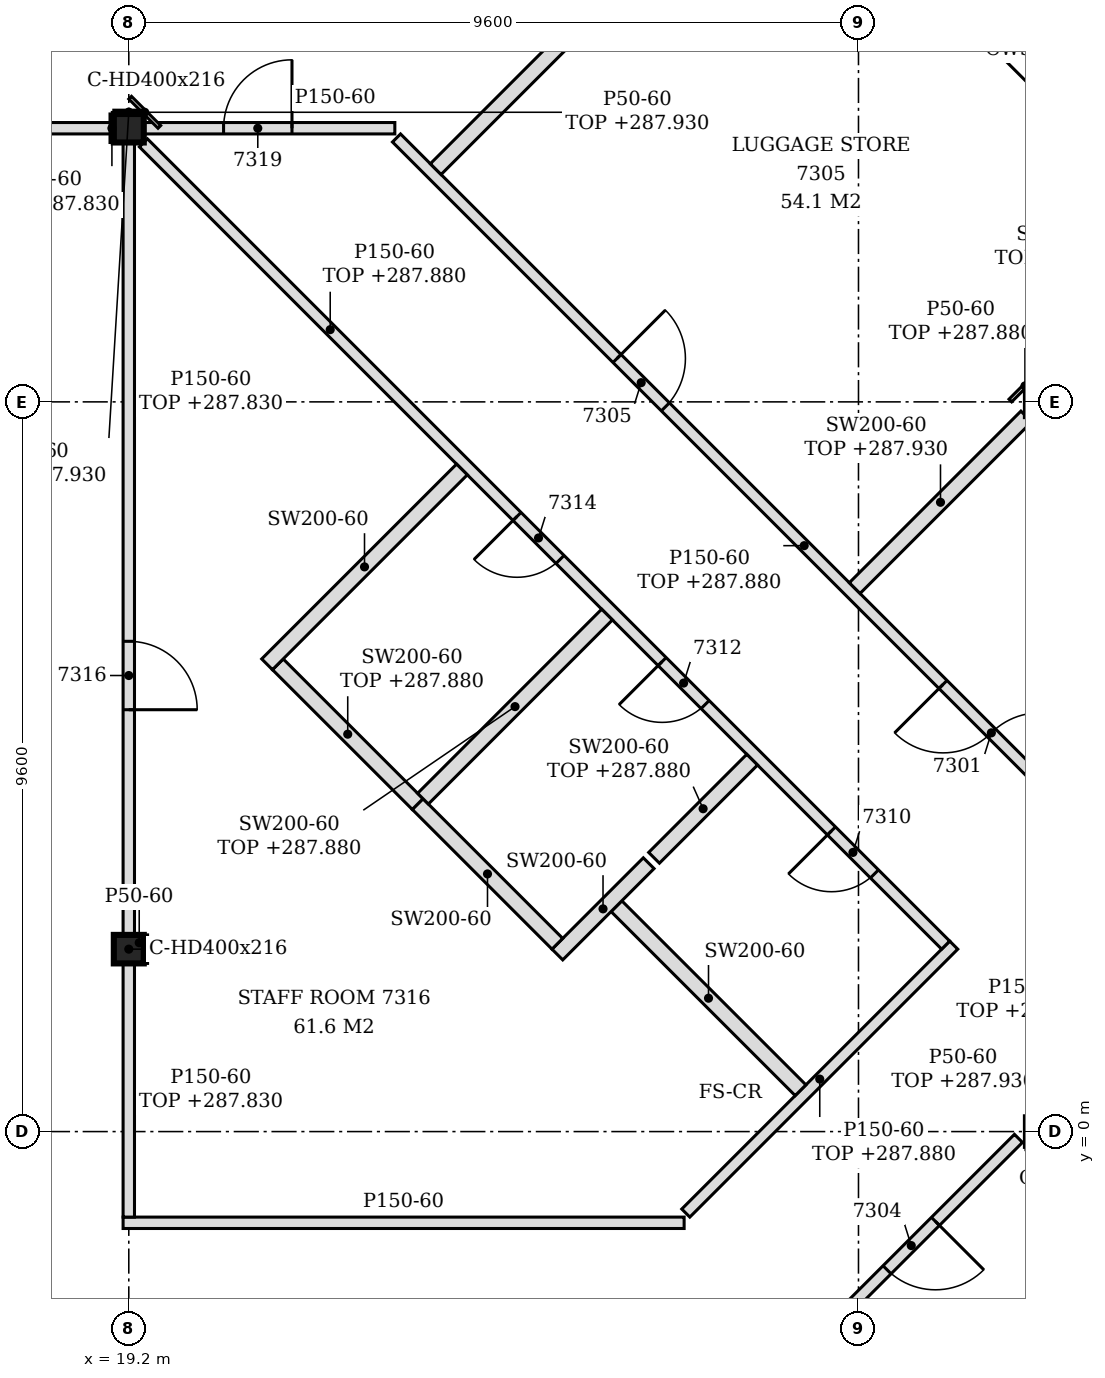
"""IFC4 building model, lengths in metres.
Left out: names, types, materials, properties, quantities, classifications, styles, units other than length and angle.
Written with IfcOpenShell. Run it as: python <this file> out.ifc"""

import sys

from ifc_helpers import new_model, si_unit, direction, frame, frame_2d, origin, origin_2d, place, context, subcontext, project, spatial, polyline, rectangle, i_section, outline, extrude, element, fill, save


model = new_model("IFC4")
c1 = context("Model", 3, precision=1e-05, world=origin(), true_north=direction((0.0, 1.0)))
c2 = subcontext(c1, "Body", "Model", "MODEL_VIEW")
j1 = project(units=[si_unit("LENGTHUNIT", "METRE"), si_unit("PLANEANGLEUNIT", "RADIAN")], contexts=[c1])
p1 = place(None, origin())
s1 = spatial("IfcSite", under=j1, at=p1, CompositionType="ELEMENT")
p2 = place(p1, origin())
s2 = spatial("IfcBuilding", under=s1, at=p2, CompositionType="ELEMENT")
p3 = place(p2, frame((0.0, 0.0, 285.0)))
s3 = spatial("IfcBuildingStorey", under=s2, at=p3, CompositionType="ELEMENT", Elevation=285.0)
for number, where, z_axis, x_axis in (
    (1, (19.2, 2.4, -0.15), (0.0, 0.0, 1.0), (1.0, 0.0, 0.0)),
    (2, (19.2, 13.2, -0.15), (0.0, 0.0, 1.0), (1.0, 0.0, 0.0)),
):
    element("IfcColumn", number, at=place(p3, frame(where, z_axis=z_axis, x_axis=x_axis)), inside=s3, PredefinedType="COLUMN", context=c2, shape_type="SweptSolid", body=[
        extrude(i_section(OverallWidth=0.394, OverallDepth=0.375, WebThickness=0.017, FlangeThickness=0.028, FilletRadius=0.015, at=origin_2d()), origin(), (0.0, 0.0, 1.0), 3.6),
    ])
p4 = place(p3, frame((15.497, -15.497, 0.0), z_axis=(0.0, 0.0, 1.0), x_axis=(0.707106781187, 0.707106781187, 0.0)))
e3 = element("IfcWall", 3, at=p4, inside=s3, PredefinedType="PARTITIONING", context=c2, shape_type="SweptSolid", body=[
    extrude(rectangle(XDim=21.79, YDim=0.15, at=frame_2d((10.895, 0.0))), origin(), (0.0, 0.0, 1.0), 2.73),
])
p5 = place(p4, frame((4.927, 0.0, 0.0)))
e4 = element("IfcOpeningElement", 4, at=p5, cuts=e3, PredefinedType="OPENING", context=c2, shape_type="SweptSolid", body=[
    extrude(rectangle(XDim=0.9, YDim=2.1, at=frame_2d((0.45, 1.05))), frame((0.0, 0.085, 0.0), z_axis=(0.0, -1.0, 0.0), x_axis=(1.0, 0.0, 0.0)), (0.0, 0.0, 1.0), 0.17),
])
p6 = place(p4, frame((10.926, 0.0, 0.0)))
e5 = element("IfcOpeningElement", 5, at=p6, cuts=e3, PredefinedType="OPENING", context=c2, shape_type="SweptSolid", body=[
    extrude(rectangle(XDim=0.9, YDim=2.1, at=frame_2d((0.45, 1.05))), frame((0.0, 0.085, 0.0), z_axis=(0.0, -1.0, 0.0), x_axis=(1.0, 0.0, 0.0)), (0.0, 0.0, 1.0), 0.17),
])
p7 = place(p4, frame((19.345, 0.0, 0.0)))
e6 = element("IfcOpeningElement", 6, at=p7, cuts=e3, PredefinedType="OPENING", context=c2, shape_type="SweptSolid", body=[
    extrude(rectangle(XDim=0.9, YDim=2.1, at=frame_2d((0.45, 1.05))), frame((0.0, 0.085, 0.0), z_axis=(0.0, -1.0, 0.0), x_axis=(1.0, 0.0, 0.0)), (0.0, 0.0, 1.0), 0.17),
])
p8 = place(p3, frame((19.125, -1.2, 0.0), z_axis=(0.0, 0.0, 1.0), x_axis=(1.0, 0.0, 0.0)))
e7 = element("IfcWall", 7, at=p8, inside=s3, PredefinedType="PARTITIONING", context=c2, shape_type="SweptSolid", body=[
    extrude(outline(polyline([(0.0, 0.0), (7.381, 0.0), (7.381, 3.45), (0.225, 3.45), (0.223, 2.83), (0.0, 2.83), (0.0, 0.0)])), frame((0.0, 0.075, 0.0), z_axis=(0.0, -1.0, 0.0), x_axis=(1.0, 0.0, 0.0)), (0.0, 0.0, 1.0), 0.15),
])
p9 = place(p3, frame((19.2, -1.125, 0.0), z_axis=(0.0, 0.0, 1.0), x_axis=(0.0, 1.0, 0.0)))
e8 = element("IfcWall", 8, at=p9, inside=s3, PredefinedType="PARTITIONING", context=c2, shape_type="SweptSolid", body=[
    extrude(rectangle(XDim=3.337, YDim=0.15, at=frame_2d((1.669, 0.0))), origin(), (0.0, 0.0, 1.0), 2.83),
])
p10 = place(p3, frame((26.528, -1.072, 0.0), z_axis=(0.0, 0.0, 1.0), x_axis=(0.707106781187, 0.707106781187, 0.0)))
e9 = element("IfcWall", 9, at=p10, inside=s3, PredefinedType="PARTITIONING", context=c2, shape_type="SweptSolid", body=[
    extrude(rectangle(XDim=4.985, YDim=0.15, at=frame_2d((2.492, 0.0))), origin(), (0.0, 0.0, 1.0), 2.88),
])
p11 = place(p3, frame((28.038, 0.544, 0.0), z_axis=(0.0, 0.0, 1.0), x_axis=(-0.707213699878, 0.706999846325, 0.0)))
e10 = element("IfcWall", 10, at=p11, inside=s3, PredefinedType="PARTITIONING", context=c2, shape_type="SweptSolid", body=[
    extrude(rectangle(XDim=3.425, YDim=0.2, at=frame_2d((1.712, 0.0))), origin(), (0.0, 0.0, 1.0), 3.45),
])
p12 = place(p3, frame((24.838, 2.329, 0.0), z_axis=(0.0, 0.0, 1.0), x_axis=(0.707034938994, 0.70717861608, 0.0)))
e11 = element("IfcWall", 11, at=p12, inside=s3, PredefinedType="PARTITIONING", context=c2, shape_type="SweptSolid", body=[
    extrude(rectangle(XDim=1.699, YDim=0.2, at=frame_2d((0.85, 0.0))), origin(), (0.0, 0.0, 1.0), 3.45),
])
p13 = place(p3, frame((24.838, 2.471, 0.0), z_axis=(0.0, 0.0, 1.0), x_axis=(-0.707106781187, 0.707106781187, 0.0)))
e12 = element("IfcWall", 12, at=p13, inside=s3, PredefinedType="PARTITIONING", context=c2, shape_type="SweptSolid", body=[
    extrude(rectangle(XDim=2.6, YDim=0.2, at=frame_2d((1.3, 0.0))), origin(), (0.0, 0.0, 1.0), 3.45),
])
p14 = place(p3, frame((29.947, 2.453, 0.0), z_axis=(0.0, 0.0, 1.0), x_axis=(-0.707098603185, 0.707114959093, 0.0)))
e13 = element("IfcWall", 13, at=p14, inside=s3, PredefinedType="PARTITIONING", context=c2, shape_type="SweptSolid", body=[
    extrude(rectangle(XDim=14.927, YDim=0.15, at=frame_2d((7.463, 0.0))), origin(), (0.0, 0.0, 1.0), 2.88),
])
p15 = place(p14, frame((1.325, 0.0, 0.0)))
e14 = element("IfcOpeningElement", 14, at=p15, cuts=e13, PredefinedType="OPENING", context=c2, shape_type="SweptSolid", body=[
    extrude(rectangle(XDim=0.8, YDim=2.1, at=frame_2d((0.4, 1.05))), frame((0.0, 0.085, 0.0), z_axis=(0.0, -1.0, 0.0), x_axis=(1.0, 0.0, 0.0)), (0.0, 0.0, 1.0), 0.17),
])
p16 = place(p14, frame((4.476, 0.0, 0.0)))
e15 = element("IfcOpeningElement", 15, at=p16, cuts=e13, PredefinedType="OPENING", context=c2, shape_type="SweptSolid", body=[
    extrude(rectangle(XDim=0.8, YDim=2.1, at=frame_2d((0.4, 1.05))), frame((0.0, 0.085, 0.0), z_axis=(0.0, -1.0, 0.0), x_axis=(1.0, 0.0, 0.0)), (0.0, 0.0, 1.0), 0.17),
])
p17 = place(p14, frame((7.175, 0.0, 0.0)))
e16 = element("IfcOpeningElement", 16, at=p17, cuts=e13, PredefinedType="OPENING", context=c2, shape_type="SweptSolid", body=[
    extrude(rectangle(XDim=0.8, YDim=2.1, at=frame_2d((0.4, 1.05))), frame((0.0, 0.085, 0.0), z_axis=(0.0, -1.0, 0.0), x_axis=(1.0, 0.0, 0.0)), (0.0, 0.0, 1.0), 0.17),
])
p18 = place(p3, frame((19.2, 2.587, 0.0), z_axis=(0.0, 0.0, 1.0), x_axis=(0.0, 1.0, 0.0)))
e17 = element("IfcWall", 17, at=p18, inside=s3, PredefinedType="PARTITIONING", context=c2, shape_type="SweptSolid", body=[
    extrude(rectangle(XDim=10.425, YDim=0.15, at=frame_2d((5.212, 0.0))), origin(), (0.0, 0.0, 1.0), 2.83),
])
p19 = place(p18, frame((2.962, 0.0, 0.0)))
e18 = element("IfcOpeningElement", 18, at=p19, cuts=e17, PredefinedType="OPENING", context=c2, shape_type="SweptSolid", body=[
    extrude(rectangle(XDim=0.9, YDim=2.1, at=frame_2d((0.45, 1.05))), frame((0.0, 0.085, 0.0), z_axis=(0.0, -1.0, 0.0), x_axis=(1.0, 0.0, 0.0)), (0.0, 0.0, 1.0), 0.17),
])
p20 = place(p3, frame((32.272, 3.522, 0.0), z_axis=(0.0, 0.0, 1.0), x_axis=(-0.707097742657, 0.707115819601, 0.0)))
e19 = element("IfcWall", 19, at=p20, inside=s3, PredefinedType="PARTITIONING", context=c2, shape_type="SweptSolid", body=[
    extrude(rectangle(XDim=13.506, YDim=0.15, at=frame_2d((6.753, 0.0))), origin(), (0.0, 0.0, 1.0), 2.88),
])
p21 = place(p20, frame((1.538, 0.0, 0.0)))
e20 = element("IfcOpeningElement", 20, at=p21, cuts=e19, PredefinedType="OPENING", context=c2, shape_type="SweptSolid", body=[
    extrude(rectangle(XDim=1.8, YDim=2.1, at=frame_2d((0.9, 1.05))), frame((0.0, 0.085, 0.0), z_axis=(0.0, -1.0, 0.0), x_axis=(1.0, 0.0, 0.0)), (0.0, 0.0, 1.0), 0.17),
])
p22 = place(p20, frame((8.503, 0.0, 0.0)))
e21 = element("IfcOpeningElement", 21, at=p22, cuts=e19, PredefinedType="OPENING", context=c2, shape_type="SweptSolid", body=[
    extrude(rectangle(XDim=0.9, YDim=2.1, at=frame_2d((0.45, 1.05))), frame((0.0, 0.085, 0.0), z_axis=(0.0, -1.0, 0.0), x_axis=(1.0, 0.0, 0.0)), (0.0, 0.0, 1.0), 0.17),
])
p23 = place(p3, frame((26.111, 3.602, 0.0), z_axis=(0.0, 0.0, 1.0), x_axis=(0.706906117117, 0.707307388328, 0.0)))
e22 = element("IfcWall", 22, at=p23, inside=s3, PredefinedType="PARTITIONING", context=c2, shape_type="SweptSolid", body=[
    extrude(rectangle(XDim=1.825, YDim=0.2, at=frame_2d((0.913, 0.0))), origin(), (0.0, 0.0, 1.0), 2.88),
])
p24 = place(p3, frame((23.0, 4.309, 0.0), z_axis=(0.0, 0.0, 1.0), x_axis=(-0.707294541873, 0.70691897063, 0.0)))
e23 = element("IfcWall", 23, at=p24, inside=s3, PredefinedType="PARTITIONING", context=c2, shape_type="SweptSolid", body=[
    extrude(rectangle(XDim=2.6, YDim=0.2, at=frame_2d((1.3, 0.0))), origin(), (0.0, 0.0, 1.0), 2.88),
])
p25 = place(p3, frame((23.071, 4.38, 0.0), z_axis=(0.0, 0.0, 1.0), x_axis=(0.706928547439, 0.70728497002, 0.0)))
e24 = element("IfcWall", 24, at=p25, inside=s3, PredefinedType="PARTITIONING", context=c2, shape_type="SweptSolid", body=[
    extrude(rectangle(XDim=3.425, YDim=0.2, at=frame_2d((1.712, 0.0))), origin(), (0.0, 0.0, 1.0), 2.88),
])
p26 = place(p3, frame((21.019, 6.147, 0.0), z_axis=(0.0, 0.0, 1.0), x_axis=(0.707106781187, 0.707106781187, 0.0)))
e25 = element("IfcWall", 25, at=p26, inside=s3, PredefinedType="PARTITIONING", context=c2, shape_type="SweptSolid", body=[
    extrude(rectangle(XDim=3.626, YDim=0.2, at=frame_2d((1.813, 0.0))), origin(), (0.0, 0.0, 1.0), 3.45),
])
p27 = place(p3, frame((28.75, 7.15, 0.0), z_axis=(0.0, 0.0, 1.0), x_axis=(0.707106781187, 0.707106781187, 0.0)))
e26 = element("IfcWall", 26, at=p27, inside=s3, PredefinedType="PARTITIONING", context=c2, shape_type="SweptSolid", body=[
    extrude(rectangle(XDim=3.193, YDim=0.2, at=frame_2d((1.597, 0.0))), origin(), (0.0, 0.0, 1.0), 2.93),
])
p28 = place(p3, frame((23.238, 12.662, 0.0), z_axis=(0.0, 0.0, 1.0), x_axis=(0.707106781187, 0.707106781187, 0.0)))
e27 = element("IfcWall", 27, at=p28, inside=s3, PredefinedType="PARTITIONING", context=c2, shape_type="SweptSolid", body=[
    extrude(rectangle(XDim=5.69, YDim=0.2, at=frame_2d((2.845, 0.0))), origin(), (0.0, 0.0, 1.0), 2.93),
])
p29 = place(p3, frame((7.397, 13.2, 0.0), z_axis=(0.0, 0.0, 1.0), x_axis=(1.0, 0.0, 0.0)))
e28 = element("IfcWall", 28, at=p29, inside=s3, PredefinedType="PARTITIONING", context=c2, shape_type="SweptSolid", body=[
    extrude(rectangle(XDim=11.606, YDim=0.15, at=frame_2d((5.803, 0.0))), origin(), (0.0, 0.0, 1.0), 2.83),
])
p30 = place(p29, frame((8.26, 0.0, 0.0)))
e29 = element("IfcOpeningElement", 29, at=p30, cuts=e28, PredefinedType="OPENING", context=c2, shape_type="SweptSolid", body=[
    extrude(rectangle(XDim=0.9, YDim=2.1, at=frame_2d((0.45, 1.05))), frame((0.0, 0.085, 0.0), z_axis=(0.0, -1.0, 0.0), x_axis=(1.0, 0.0, 0.0)), (0.0, 0.0, 1.0), 0.17),
])
p31 = place(p3, frame((19.397, 13.2, 0.0), z_axis=(0.0, 0.0, 1.0), x_axis=(1.0, 0.0, 0.0)))
e30 = element("IfcWall", 30, at=p31, inside=s3, PredefinedType="PARTITIONING", context=c2, shape_type="SweptSolid", body=[
    extrude(rectangle(XDim=3.303, YDim=0.15, at=frame_2d((1.652, 0.0))), origin(), (0.0, 0.0, 1.0), 3.45),
])
p32 = place(p31, frame((1.05, 0.0, 0.0)))
e31 = element("IfcOpeningElement", 31, at=p32, cuts=e30, PredefinedType="OPENING", context=c2, shape_type="SweptSolid", body=[
    extrude(rectangle(XDim=0.9, YDim=2.1, at=frame_2d((0.45, 1.05))), frame((0.0, 0.085, 0.0), z_axis=(0.0, -1.0, 0.0), x_axis=(1.0, 0.0, 0.0)), (0.0, 0.0, 1.0), 0.17),
])
p33 = place(p3, frame((19.422, 2.212, 0.0), z_axis=(0.0, 0.0, 1.0), x_axis=(0.0, 1.0, 0.0)))
e32 = element("IfcWall", 32, at=p33, inside=s3, PredefinedType="PARTITIONING", context=c2, shape_type="SweptSolid", body=[
    extrude(rectangle(XDim=0.375, YDim=0.05, at=frame_2d((0.188, 0.0))), origin(), (0.0, 0.0, 1.0), 3.45),
])
p34 = place(p3, frame((18.978, 13.012, 0.0), z_axis=(0.0, 0.0, 1.0), x_axis=(0.0, 1.0, 0.0)))
e33 = element("IfcWall", 33, at=p34, inside=s3, PredefinedType="PARTITIONING", context=c2, shape_type="SweptSolid", body=[
    extrude(rectangle(XDim=0.375, YDim=0.05, at=frame_2d((0.188, 0.0))), origin(), (0.0, 0.0, 1.0), 2.83),
])
p35 = place(p3, frame((19.602, 13.218, 0.0), z_axis=(0.0, 0.0, 1.0), x_axis=(-0.707106781187, 0.707106781187, 0.0)))
e34 = element("IfcWall", 34, at=p35, inside=s3, PredefinedType="PARTITIONING", context=c2, shape_type="SweptSolid", body=[
    extrude(rectangle(XDim=0.544, YDim=0.05, at=frame_2d((0.272, 0.0))), origin(), (0.0, 0.0, 1.0), 2.93),
])
p36 = place(p3, frame((30.798, 9.618, 0.0), z_axis=(0.0, 0.0, 1.0), x_axis=(0.707106781187, 0.707106781187, 0.0)))
e35 = element("IfcWall", 35, at=p36, inside=s3, PredefinedType="PARTITIONING", context=c2, shape_type="SweptSolid", body=[
    extrude(rectangle(XDim=0.544, YDim=0.05, at=frame_2d((0.272, 0.0))), origin(), (0.0, 0.0, 1.0), 2.88),
])
p37 = place(p3, frame((19.003, 13.413, 0.0), z_axis=(0.0, 0.0, 1.0), x_axis=(1.0, 0.0, 0.0)))
e36 = element("IfcWall", 36, at=p37, inside=s3, PredefinedType="PARTITIONING", context=c2, shape_type="SweptSolid", body=[
    extrude(rectangle(XDim=0.394, YDim=0.05, at=frame_2d((0.197, 0.0))), origin(), (0.0, 0.0, 1.0), 2.93),
])
p38 = place(p21, frame((1.8, 0.0, 0.0), z_axis=(0.0, 0.0, 1.0), x_axis=(-1.0, 0.0, 0.0)))
e37 = element("IfcDoor", 37, at=p38, inside=s3, OperationType="DOUBLE_DOOR_SINGLE_SWING", PredefinedType="DOOR", context=c2, shape_type="SweptSolid", body=[
    extrude(rectangle(XDim=1.8, YDim=2.1, at=frame_2d((0.9, 1.05))), frame((0.0, 0.025, 0.0), z_axis=(0.0, -1.0, 0.0), x_axis=(1.0, 0.0, 0.0)), (0.0, 0.0, 1.0), 0.05),
])
fill(e20, e37)
p39 = place(p7, frame((0.9, 0.0, 0.0), z_axis=(0.0, 0.0, 1.0), x_axis=(-1.0, 0.0, 0.0)))
e38 = element("IfcDoor", 38, at=p39, inside=s3, OperationType="SINGLE_SWING_LEFT", PredefinedType="DOOR", context=c2, shape_type="SweptSolid", body=[
    extrude(rectangle(XDim=0.9, YDim=2.1, at=frame_2d((0.45, 1.05))), frame((0.0, 0.025, 0.0), z_axis=(0.0, -1.0, 0.0), x_axis=(1.0, 0.0, 0.0)), (0.0, 0.0, 1.0), 0.05),
])
fill(e6, e38)
p40 = place(p22, frame((0.9, 0.0, 0.0), z_axis=(0.0, 0.0, 1.0), x_axis=(-1.0, 0.0, 0.0)))
e39 = element("IfcDoor", 39, at=p40, inside=s3, OperationType="SINGLE_SWING_LEFT", PredefinedType="DOOR", context=c2, shape_type="SweptSolid", body=[
    extrude(rectangle(XDim=0.9, YDim=2.1, at=frame_2d((0.45, 1.05))), frame((0.0, 0.025, 0.0), z_axis=(0.0, -1.0, 0.0), x_axis=(1.0, 0.0, 0.0)), (0.0, 0.0, 1.0), 0.05),
])
fill(e21, e39)
p41 = place(p15, origin())
e40 = element("IfcDoor", 40, at=p41, inside=s3, OperationType="SINGLE_SWING_RIGHT", PredefinedType="DOOR", context=c2, shape_type="SweptSolid", body=[
    extrude(rectangle(XDim=0.8, YDim=2.1, at=frame_2d((0.4, 1.05))), frame((0.0, 0.025, 0.0), z_axis=(0.0, -1.0, 0.0), x_axis=(1.0, 0.0, 0.0)), (0.0, 0.0, 1.0), 0.05),
])
fill(e14, e40)
p42 = place(p16, origin())
e41 = element("IfcDoor", 41, at=p42, inside=s3, OperationType="SINGLE_SWING_RIGHT", PredefinedType="DOOR", context=c2, shape_type="SweptSolid", body=[
    extrude(rectangle(XDim=0.8, YDim=2.1, at=frame_2d((0.4, 1.05))), frame((0.0, 0.025, 0.0), z_axis=(0.0, -1.0, 0.0), x_axis=(1.0, 0.0, 0.0)), (0.0, 0.0, 1.0), 0.05),
])
fill(e15, e41)
p43 = place(p17, origin())
e42 = element("IfcDoor", 42, at=p43, inside=s3, OperationType="SINGLE_SWING_RIGHT", PredefinedType="DOOR", context=c2, shape_type="SweptSolid", body=[
    extrude(rectangle(XDim=0.8, YDim=2.1, at=frame_2d((0.4, 1.05))), frame((0.0, 0.025, 0.0), z_axis=(0.0, -1.0, 0.0), x_axis=(1.0, 0.0, 0.0)), (0.0, 0.0, 1.0), 0.05),
])
fill(e16, e42)
p44 = place(p19, frame((0.9, 0.0, 0.0), z_axis=(0.0, 0.0, 1.0), x_axis=(-1.0, 0.0, 0.0)))
e43 = element("IfcDoor", 43, at=p44, inside=s3, OperationType="SINGLE_SWING_RIGHT", PredefinedType="DOOR", context=c2, shape_type="SweptSolid", body=[
    extrude(rectangle(XDim=0.9, YDim=2.1, at=frame_2d((0.45, 1.05))), frame((0.0, 0.025, 0.0), z_axis=(0.0, -1.0, 0.0), x_axis=(1.0, 0.0, 0.0)), (0.0, 0.0, 1.0), 0.05),
])
fill(e18, e43)
p45 = place(p32, origin())
e44 = element("IfcDoor", 44, at=p45, inside=s3, OperationType="SINGLE_SWING_RIGHT", PredefinedType="DOOR", context=c2, shape_type="SweptSolid", body=[
    extrude(rectangle(XDim=0.9, YDim=2.1, at=frame_2d((0.45, 1.05))), frame((0.0, 0.025, 0.0), z_axis=(0.0, -1.0, 0.0), x_axis=(1.0, 0.0, 0.0)), (0.0, 0.0, 1.0), 0.05),
])
fill(e31, e44)
save(model, sys.argv[1])
